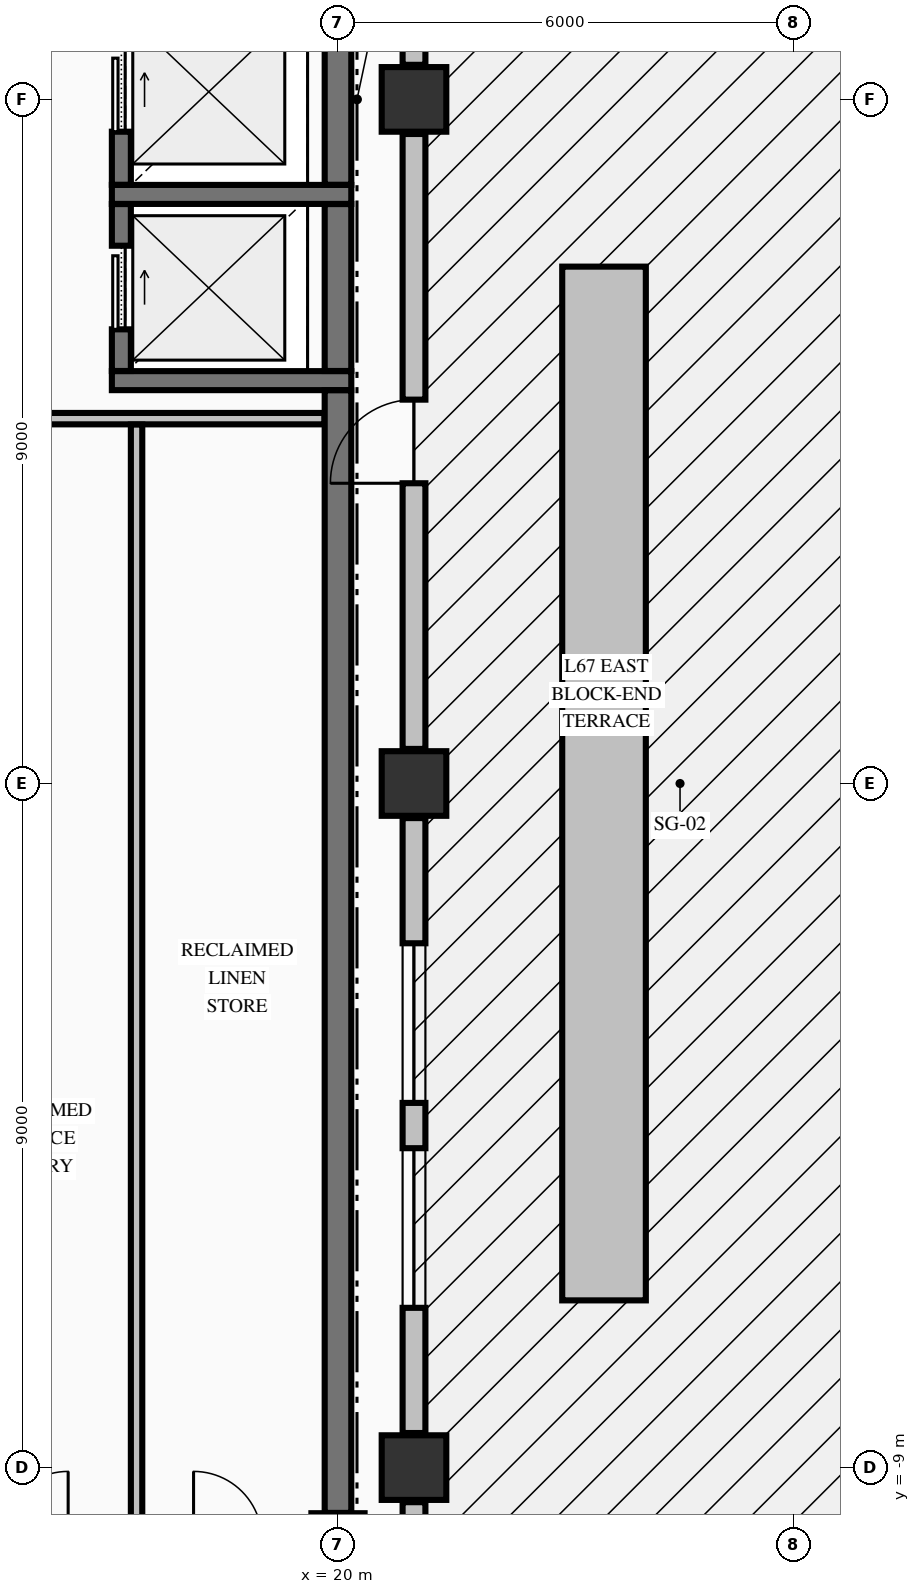
"""IFC4 building model, lengths in metres.
Left out: names, types, materials, properties, quantities, classifications, styles, units other than length and angle.
Written with IfcOpenShell. Run it as: python <this file> out.ifc"""

import sys

from ifc_helpers import new_model, si_unit, direction, frame, frame_2d, origin, origin_2d, place, context, subcontext, project, spatial, rectangle, extrude, element, fill, save


model = new_model("IFC4")
c1 = context("Model", 3, precision=1e-05, world=origin(), true_north=direction((0.0, 1.0)))
c2 = subcontext(c1, "Body", "Model", "MODEL_VIEW")
j1 = project(units=[si_unit("LENGTHUNIT", "METRE"), si_unit("PLANEANGLEUNIT", "RADIAN")], contexts=[c1])
p1 = place(None, origin())
s1 = spatial("IfcSite", under=j1, at=p1, CompositionType="ELEMENT")
p2 = place(p1, origin())
s2 = spatial("IfcBuilding", under=s1, at=p2, CompositionType="ELEMENT")
p3 = place(p2, frame((0.0, 0.0, 254.43)))
s3 = spatial("IfcBuildingStorey", under=s2, at=p3, CompositionType="ELEMENT", Elevation=254.43)
for number, where, z_axis, x_axis in (
    (1, (21.0, -9.0, -0.425), (0.0, 0.0, 1.0), (1.0, 0.0, 0.0)),
    (2, (21.0, 0.0, -0.425), (0.0, 0.0, 1.0), (1.0, 0.0, 0.0)),
    (3, (21.0, 9.0, -0.425), (0.0, 0.0, 1.0), (1.0, 0.0, 0.0)),
):
    element("IfcColumn", number, at=place(p3, frame(where, z_axis=z_axis, x_axis=x_axis)), inside=s3, PredefinedType="COLUMN", context=c2, shape_type="SweptSolid", body=[
        extrude(rectangle(XDim=0.85, YDim=0.85, at=origin_2d()), origin(), (0.0, 0.0, 1.0), 3.405),
    ])
p4 = place(p3, frame((20.0, -9.95, -0.425), z_axis=(0.0, 0.0, 1.0), x_axis=(1.0, 0.0, 0.0)))
e4 = element("IfcColumn", 4, at=p4, inside=s3, PredefinedType="COLUMN", context=c2, shape_type="SweptSolid", body=[
    extrude(rectangle(XDim=0.7, YDim=0.7, at=origin_2d()), origin(), (0.0, 0.0, 1.0), 3.405),
])
p5 = place(p3, frame((21.0, -17.545, 0.0), z_axis=(0.0, 0.0, 1.0), x_axis=(0.0, 1.0, 0.0)))
e5 = element("IfcWall", 5, at=p5, inside=s3, PredefinedType="STANDARD", context=c2, shape_type="SweptSolid", body=[
    extrude(rectangle(XDim=8.09, YDim=0.3, at=frame_2d((4.045, 0.0))), origin(), (0.0, 0.0, 1.0), 2.372),
])
p6 = place(p3, frame((21.0, -8.545, 0.0), z_axis=(0.0, 0.0, 1.0), x_axis=(0.0, 1.0, 0.0)))
e6 = element("IfcWall", 6, at=p6, inside=s3, PredefinedType="STANDARD", context=c2, shape_type="SweptSolid", body=[
    extrude(rectangle(XDim=8.09, YDim=0.3, at=frame_2d((4.045, 0.0))), origin(), (0.0, 0.0, 1.0), 2.372),
])
p7 = place(p6, frame((1.647, 0.0, 0.7)))
e7 = element("IfcOpeningElement", 7, at=p7, cuts=e6, PredefinedType="OPENING", context=c2, shape_type="SweptSolid", body=[
    extrude(rectangle(XDim=2.1, YDim=1.5, at=frame_2d((1.05, 0.75))), frame((0.0, 0.16, 0.0), z_axis=(0.0, -1.0, 0.0), x_axis=(1.0, 0.0, 0.0)), (0.0, 0.0, 1.0), 0.32),
])
p8 = place(p6, frame((4.343, 0.0, 0.7)))
e8 = element("IfcOpeningElement", 8, at=p8, cuts=e6, PredefinedType="OPENING", context=c2, shape_type="SweptSolid", body=[
    extrude(rectangle(XDim=2.1, YDim=1.5, at=frame_2d((1.05, 0.75))), frame((0.0, 0.16, 0.0), z_axis=(0.0, -1.0, 0.0), x_axis=(1.0, 0.0, 0.0)), (0.0, 0.0, 1.0), 0.32),
])
p9 = place(p3, frame((21.0, 0.455, 0.0), z_axis=(0.0, 0.0, 1.0), x_axis=(0.0, 1.0, 0.0)))
e9 = element("IfcWall", 9, at=p9, inside=s3, PredefinedType="STANDARD", context=c2, shape_type="SweptSolid", body=[
    extrude(rectangle(XDim=8.09, YDim=0.3, at=frame_2d((4.045, 0.0))), origin(), (0.0, 0.0, 1.0), 2.372),
])
p10 = place(p9, frame((3.495, 0.0, 0.0)))
e10 = element("IfcOpeningElement", 10, at=p10, cuts=e9, PredefinedType="OPENING", context=c2, shape_type="SweptSolid", body=[
    extrude(rectangle(XDim=1.1, YDim=2.15, at=frame_2d((0.55, 1.075))), frame((0.0, 0.16, 0.0), z_axis=(0.0, -1.0, 0.0), x_axis=(1.0, 0.0, 0.0)), (0.0, 0.0, 1.0), 0.32),
])
p11 = place(p3, frame((21.0, 9.455, 0.0), z_axis=(0.0, 0.0, 1.0), x_axis=(0.0, 1.0, 0.0)))
e11 = element("IfcWall", 11, at=p11, inside=s3, PredefinedType="STANDARD", context=c2, shape_type="SweptSolid", body=[
    extrude(rectangle(XDim=8.09, YDim=0.3, at=frame_2d((4.045, 0.0))), origin(), (0.0, 0.0, 1.0), 2.372),
])
for number, where, z_axis, x_axis in (
    (12, (17.025, 5.3, 0.0), (0.0, 0.0, 1.0), (1.0, 0.0, 0.0)),
    (13, (17.025, 7.75, 0.0), (0.0, 0.0, 1.0), (1.0, 0.0, 0.0)),
):
    element("IfcWall", number, at=place(p3, frame(where, z_axis=z_axis, x_axis=x_axis)), inside=s3, PredefinedType="SOLIDWALL", context=c2, shape_type="SweptSolid", body=[
        extrude(rectangle(XDim=3.15, YDim=0.25, at=frame_2d((1.575, 0.0))), origin(), (0.0, 0.0, 1.0), 2.98),
    ])
p12 = place(p3, frame((14.878, 4.8, 0.0), z_axis=(0.0, 0.0, 1.0), x_axis=(1.0, 0.0, 0.0)))
e14 = element("IfcWall", 14, at=p12, inside=s3, PredefinedType="PARTITIONING", context=c2, shape_type="SweptSolid", body=[
    extrude(rectangle(XDim=4.944, YDim=0.15, at=frame_2d((2.472, 0.0))), origin(), (0.0, 0.0, 1.0), 2.98),
])
p13 = place(p3, frame((17.15, 5.427, 0.0), z_axis=(0.0, 0.0, 1.0), x_axis=(0.0, 1.0, 0.0)))
e15 = element("IfcWall", 15, at=p13, inside=s3, PredefinedType="SOLIDWALL", context=c2, shape_type="SweptSolid", body=[
    extrude(rectangle(XDim=2.196, YDim=0.25, at=frame_2d((1.098, 0.0))), origin(), (0.0, 0.0, 1.0), 2.98),
])
p14 = place(p13, frame((0.548, 0.0, 0.0)))
e16 = element("IfcOpeningElement", 16, at=p14, cuts=e15, PredefinedType="OPENING", context=c2, shape_type="SweptSolid", body=[
    extrude(rectangle(XDim=1.1, YDim=2.2, at=frame_2d((0.55, 1.1))), frame((0.0, 0.135, 0.0), z_axis=(0.0, -1.0, 0.0), x_axis=(1.0, 0.0, 0.0)), (0.0, 0.0, 1.0), 0.27),
])
p15 = place(p3, frame((17.15, 7.877, 0.0), z_axis=(0.0, 0.0, 1.0), x_axis=(0.0, 1.0, 0.0)))
e17 = element("IfcWall", 17, at=p15, inside=s3, PredefinedType="SOLIDWALL", context=c2, shape_type="SweptSolid", body=[
    extrude(rectangle(XDim=2.446, YDim=0.25, at=frame_2d((1.223, 0.0))), origin(), (0.0, 0.0, 1.0), 2.98),
])
p16 = place(p15, frame((0.698, 0.0, 0.0)))
e18 = element("IfcOpeningElement", 18, at=p16, cuts=e17, PredefinedType="OPENING", context=c2, shape_type="SweptSolid", body=[
    extrude(rectangle(XDim=1.1, YDim=2.2, at=frame_2d((0.55, 1.1))), frame((0.0, 0.135, 0.0), z_axis=(0.0, -1.0, 0.0), x_axis=(1.0, 0.0, 0.0)), (0.0, 0.0, 1.0), 0.27),
])
p17 = place(p3, frame((20.0, -9.596, 0.0), z_axis=(0.0, 0.0, 1.0), x_axis=(0.0, 1.0, 0.0)))
e19 = element("IfcWall", 19, at=p17, inside=s3, PredefinedType="SHEAR", context=c2, shape_type="SweptSolid", body=[
    extrude(rectangle(XDim=14.769, YDim=0.35, at=frame_2d((7.385, 0.0))), origin(), (0.0, 0.0, 1.0), 2.98),
])
p18 = place(p3, frame((20.0, 5.427, 0.0), z_axis=(0.0, 0.0, 1.0), x_axis=(0.0, 1.0, 0.0)))
e20 = element("IfcWall", 20, at=p18, inside=s3, PredefinedType="SHEAR", context=c2, shape_type="SweptSolid", body=[
    extrude(rectangle(XDim=2.196, YDim=0.35, at=frame_2d((1.098, 0.0))), origin(), (0.0, 0.0, 1.0), 2.98),
])
p19 = place(p3, frame((20.0, 7.877, 0.0), z_axis=(0.0, 0.0, 1.0), x_axis=(0.0, 1.0, 0.0)))
e21 = element("IfcWall", 21, at=p19, inside=s3, PredefinedType="SHEAR", context=c2, shape_type="SweptSolid", body=[
    extrude(rectangle(XDim=2.269, YDim=0.35, at=frame_2d((1.135, 0.0))), origin(), (0.0, 0.0, 1.0), 2.98),
])
p20 = place(p3, frame((17.35, -9.772, 0.0), z_axis=(0.0, 0.0, 1.0), x_axis=(0.0, 1.0, 0.0)))
e22 = element("IfcWall", 22, at=p20, inside=s3, PredefinedType="PARTITIONING", context=c2, shape_type="SweptSolid", body=[
    extrude(rectangle(XDim=14.494, YDim=0.15, at=frame_2d((7.247, 0.0))), origin(), (0.0, 0.0, 1.0), 2.98),
])
p21 = place(p3, frame((23.5, -6.8, -0.04), z_axis=(0.0, 0.0, 1.0), x_axis=(0.0, 1.0, 0.0)))
e23 = element("IfcWall", 23, at=p21, inside=s3, PredefinedType="PARAPET", context=c2, shape_type="SweptSolid", body=[
    extrude(rectangle(XDim=13.6, YDim=1.1, at=frame_2d((6.8, 0.0))), origin(), (0.0, 0.0, 1.0), 0.6),
])
p22 = place(p7, origin())
e24 = element("IfcWindow", 24, at=p22, inside=s3, PartitioningType="SINGLE_PANEL", PredefinedType="WINDOW", context=c2, shape_type="SweptSolid", body=[
    extrude(rectangle(XDim=2.1, YDim=1.5, at=frame_2d((1.05, 0.75))), frame((0.0, 0.03, 0.0), z_axis=(0.0, -1.0, 0.0), x_axis=(1.0, 0.0, 0.0)), (0.0, 0.0, 1.0), 0.06),
])
fill(e7, e24)
p23 = place(p8, origin())
e25 = element("IfcWindow", 25, at=p23, inside=s3, PartitioningType="SINGLE_PANEL", PredefinedType="WINDOW", context=c2, shape_type="SweptSolid", body=[
    extrude(rectangle(XDim=2.1, YDim=1.5, at=frame_2d((1.05, 0.75))), frame((0.0, 0.03, 0.0), z_axis=(0.0, -1.0, 0.0), x_axis=(1.0, 0.0, 0.0)), (0.0, 0.0, 1.0), 0.06),
])
fill(e8, e25)
p24 = place(p10, origin())
e26 = element("IfcDoor", 26, at=p24, inside=s3, OperationType="SINGLE_SWING_LEFT", PredefinedType="DOOR", context=c2, shape_type="SweptSolid", body=[
    extrude(rectangle(XDim=1.1, YDim=2.15, at=frame_2d((0.55, 1.075))), frame((0.0, 0.025, 0.0), z_axis=(0.0, -1.0, 0.0), x_axis=(1.0, 0.0, 0.0)), (0.0, 0.0, 1.0), 0.05),
])
fill(e10, e26)
p25 = place(p14, origin())
e27 = element("IfcDoor", 27, at=p25, inside=s3, OperationType="SLIDING_TO_RIGHT", PredefinedType="DOOR", context=c2, shape_type="SweptSolid", body=[
    extrude(rectangle(XDim=1.1, YDim=2.2, at=frame_2d((0.55, 1.1))), frame((0.0, 0.025, 0.0), z_axis=(0.0, -1.0, 0.0), x_axis=(1.0, 0.0, 0.0)), (0.0, 0.0, 1.0), 0.05),
])
fill(e16, e27)
p26 = place(p16, origin())
e28 = element("IfcDoor", 28, at=p26, inside=s3, OperationType="SLIDING_TO_RIGHT", PredefinedType="DOOR", context=c2, shape_type="SweptSolid", body=[
    extrude(rectangle(XDim=1.1, YDim=2.2, at=frame_2d((0.55, 1.1))), frame((0.0, 0.025, 0.0), z_axis=(0.0, -1.0, 0.0), x_axis=(1.0, 0.0, 0.0)), (0.0, 0.0, 1.0), 0.05),
])
fill(e18, e28)
save(model, sys.argv[1])
